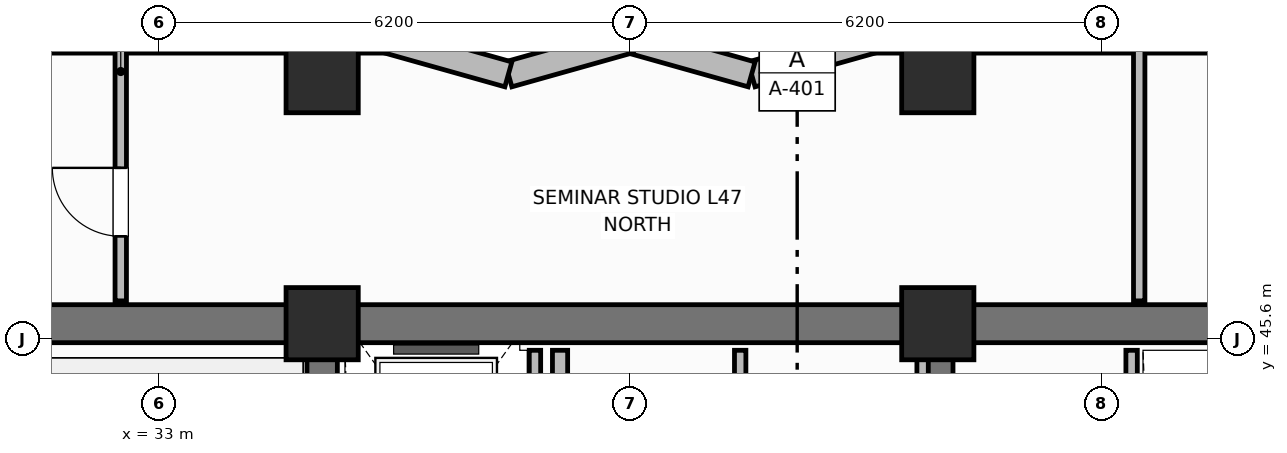
"""IFC4 building model, lengths in metres.
Left out: names, types, materials, properties, quantities, classifications, styles, units other than length and angle.
Written with IfcOpenShell. Run it as: python <this file> out.ifc"""

import sys

from ifc_helpers import new_model, si_unit, direction, frame, frame_2d, origin, origin_2d, place, context, subcontext, project, spatial, rectangle, extrude, element, fill, save


model = new_model("IFC4")
c1 = context("Model", 3, precision=1e-05, world=origin(), true_north=direction((0.0, 1.0)))
c2 = subcontext(c1, "Body", "Model", "MODEL_VIEW")
j1 = project(units=[si_unit("LENGTHUNIT", "METRE"), si_unit("PLANEANGLEUNIT", "RADIAN")], contexts=[c1])
p1 = place(None, origin())
s1 = spatial("IfcSite", under=j1, at=p1, CompositionType="ELEMENT")
p2 = place(p1, origin())
s2 = spatial("IfcBuilding", under=s1, at=p2, CompositionType="ELEMENT")
p3 = place(p2, frame((0.0, 0.0, 188.5)))
s3 = spatial("IfcBuildingStorey", under=s2, at=p3, CompositionType="ELEMENT", Elevation=188.5)
p4 = place(p3, frame((25.6, 45.8, 0.0), z_axis=(0.0, 0.0, 1.0), x_axis=(1.0, 0.0, 0.0)))
e1 = element("IfcWall", 1, at=p4, inside=s3, PredefinedType="SHEAR", context=c2, shape_type="SweptSolid", body=[
    extrude(rectangle(XDim=27.2, YDim=0.5, at=frame_2d((13.6, 0.0))), origin(), (0.0, 0.0, 1.0), 3.7),
])
for number, where, z_axis, x_axis in (
    (2, (35.15, 39.85, 0.0), (0.0, 0.0, 1.0), (0.0, 1.0, 0.0)),
    (3, (43.25, 39.85, 0.0), (0.0, 0.0, 1.0), (0.0, 1.0, 0.0)),
):
    element("IfcWall", number, at=place(p3, frame(where, z_axis=z_axis, x_axis=x_axis)), inside=s3, PredefinedType="SHEAR", context=c2, shape_type="SweptSolid", body=[
        extrude(rectangle(XDim=5.7, YDim=0.4, at=frame_2d((2.85, 0.0))), origin(), (0.0, 0.0, 1.0), 3.7),
    ])
for number, where, z_axis, x_axis in (
    (4, (35.15, 45.8, 0.0), (0.0, 0.0, 1.0), (1.0, 0.0, 0.0)),
    (5, (43.25, 45.8, 0.0), (0.0, 0.0, 1.0), (1.0, 0.0, 0.0)),
    (6, (35.15, 49.05, 0.0), (0.0, 0.0, 1.0), (1.0, 0.0, 0.0)),
    (7, (43.25, 49.05, 0.0), (0.0, 0.0, 1.0), (1.0, 0.0, 0.0)),
):
    element("IfcColumn", number, at=place(p3, frame(where, z_axis=z_axis, x_axis=x_axis)), inside=s3, PredefinedType="COLUMN", context=c2, shape_type="SweptSolid", body=[
        extrude(rectangle(XDim=0.95, YDim=0.95, at=origin_2d()), origin(), (0.0, 0.0, 1.0), 3.7),
    ])
p5 = place(p3, frame((58.2, 49.53, 0.0), z_axis=(0.0, 0.0, 1.0), x_axis=(-1.0, 0.0, 0.0)))
e8 = element("IfcWall", 8, at=p5, inside=s3, PredefinedType="SOLIDWALL", context=c2, shape_type="SweptSolid", body=[
    extrude(rectangle(XDim=15.8, YDim=0.34, at=frame_2d((7.9, 0.0))), origin(), (0.0, 0.0, 1.0), 2.72),
])
p6 = place(p5, frame((8.812, 0.0, 0.75)))
e9 = element("IfcOpeningElement", 9, at=p6, cuts=e8, PredefinedType="OPENING", context=c2, shape_type="SweptSolid", body=[
    extrude(rectangle(XDim=1.8, YDim=1.85, at=frame_2d((0.9, 0.925))), frame((0.0, 0.18, 0.0), z_axis=(0.0, -1.0, 0.0), x_axis=(1.0, 0.0, 0.0)), (0.0, 0.0, 1.0), 0.36),
])
p7 = place(p3, frame((42.4, 49.53, 0.0), z_axis=(0.0, 0.0, 1.0), x_axis=(-0.962652136636, -0.270741322725, 0.0)))
e10 = element("IfcWall", 10, at=p7, inside=s3, PredefinedType="SOLIDWALL", context=c2, shape_type="SweptSolid", body=[
    extrude(rectangle(XDim=1.662, YDim=0.34, at=frame_2d((0.831, 0.0))), origin(), (0.0, 0.0, 1.0), 2.72),
])
p8 = place(p3, frame((40.8, 49.08, 0.0), z_axis=(0.0, 0.0, 1.0), x_axis=(-0.962662902433, 0.270703040766, 0.0)))
e11 = element("IfcWall", 11, at=p8, inside=s3, PredefinedType="SOLIDWALL", context=c2, shape_type="SweptSolid", body=[
    extrude(rectangle(XDim=1.662, YDim=0.34, at=frame_2d((0.831, 0.0))), origin(), (0.0, 0.0, 1.0), 2.72),
])
p9 = place(p3, frame((39.2, 49.53, 0.0), z_axis=(0.0, 0.0, 1.0), x_axis=(-0.962652136636, -0.270741322725, 0.0)))
e12 = element("IfcWall", 12, at=p9, inside=s3, PredefinedType="SOLIDWALL", context=c2, shape_type="SweptSolid", body=[
    extrude(rectangle(XDim=1.662, YDim=0.34, at=frame_2d((0.831, 0.0))), origin(), (0.0, 0.0, 1.0), 2.72),
])
p10 = place(p3, frame((37.6, 49.08, 0.0), z_axis=(0.0, 0.0, 1.0), x_axis=(-0.962662902433, 0.270703040766, 0.0)))
e13 = element("IfcWall", 13, at=p10, inside=s3, PredefinedType="SOLIDWALL", context=c2, shape_type="SweptSolid", body=[
    extrude(rectangle(XDim=1.662, YDim=0.34, at=frame_2d((0.831, 0.0))), origin(), (0.0, 0.0, 1.0), 2.72),
])
p11 = place(p3, frame((36.0, 49.53, 0.0), z_axis=(0.0, 0.0, 1.0), x_axis=(-1.0, 0.0, 0.0)))
e14 = element("IfcWall", 14, at=p11, inside=s3, PredefinedType="SOLIDWALL", context=c2, shape_type="SweptSolid", body=[
    extrude(rectangle(XDim=15.8, YDim=0.34, at=frame_2d((7.9, 0.0))), origin(), (0.0, 0.0, 1.0), 2.72),
])
p12 = place(p11, frame((5.188, 0.0, 0.75)))
e15 = element("IfcOpeningElement", 15, at=p12, cuts=e14, PredefinedType="OPENING", context=c2, shape_type="SweptSolid", body=[
    extrude(rectangle(XDim=1.8, YDim=1.85, at=frame_2d((0.9, 0.925))), frame((0.0, 0.18, 0.0), z_axis=(0.0, -1.0, 0.0), x_axis=(1.0, 0.0, 0.0)), (0.0, 0.0, 1.0), 0.36),
])
p13 = place(p11, frame((12.788, 0.0, 0.75)))
e16 = element("IfcOpeningElement", 16, at=p13, cuts=e14, PredefinedType="OPENING", context=c2, shape_type="SweptSolid", body=[
    extrude(rectangle(XDim=1.8, YDim=1.85, at=frame_2d((0.9, 0.925))), frame((0.0, 0.18, 0.0), z_axis=(0.0, -1.0, 0.0), x_axis=(1.0, 0.0, 0.0)), (0.0, 0.0, 1.0), 0.36),
])
p14 = place(p3, frame((37.95, 42.6, 0.0), z_axis=(0.0, 0.0, 1.0), x_axis=(0.0, 1.0, 0.0)))
e17 = element("IfcWall", 17, at=p14, inside=s3, PredefinedType="PARTITIONING", context=c2, shape_type="SweptSolid", body=[
    extrude(rectangle(XDim=2.85, YDim=0.15, at=frame_2d((1.425, 0.0))), origin(), (0.0, 0.0, 1.0), 2.55),
])
p15 = place(p3, frame((38.28, 39.82, 0.0), z_axis=(0.0, 0.0, 1.0), x_axis=(0.0, 1.0, 0.0)))
e18 = element("IfcWall", 18, at=p15, inside=s3, PredefinedType="PARTITIONING", context=c2, shape_type="SweptSolid", body=[
    extrude(rectangle(XDim=5.63, YDim=0.2, at=frame_2d((2.815, 0.0))), origin(), (0.0, 0.0, 1.0), 2.55),
])
for number, where, z_axis, x_axis in (
    (19, (43.05, 39.82, 0.0), (0.0, 0.0, 1.0), (0.0, 1.0, 0.0)),
    (20, (40.65, 39.82, 0.0), (0.0, 0.0, 1.0), (0.0, 1.0, 0.0)),
    (21, (45.8, 39.82, 0.0), (0.0, 0.0, 1.0), (0.0, 1.0, 0.0)),
):
    element("IfcWall", number, at=place(p3, frame(where, z_axis=z_axis, x_axis=x_axis)), inside=s3, PredefinedType="PARTITIONING", context=c2, shape_type="SweptSolid", body=[
        extrude(rectangle(XDim=5.63, YDim=0.15, at=frame_2d((2.815, 0.0))), origin(), (0.0, 0.0, 1.0), 2.55),
    ])
p16 = place(p3, frame((32.5, 46.1, 0.0), z_axis=(0.0, 0.0, 1.0), x_axis=(0.0, 1.0, 0.0)))
e22 = element("IfcWall", 22, at=p16, inside=s3, PredefinedType="PARTITIONING", context=c2, shape_type="SweptSolid", body=[
    extrude(rectangle(XDim=3.43, YDim=0.15, at=frame_2d((1.715, 0.0))), origin(), (0.0, 0.0, 1.0), 2.55),
])
p17 = place(p16, frame((0.85, 0.0, 0.0)))
e23 = element("IfcOpeningElement", 23, at=p17, cuts=e22, PredefinedType="OPENING", context=c2, shape_type="SweptSolid", body=[
    extrude(rectangle(XDim=0.9, YDim=2.1, at=frame_2d((0.45, 1.05))), frame((0.0, 0.085, 0.0), z_axis=(0.0, -1.0, 0.0), x_axis=(1.0, 0.0, 0.0)), (0.0, 0.0, 1.0), 0.17),
])
p18 = place(p3, frame((45.9, 46.1, 0.0), z_axis=(0.0, 0.0, 1.0), x_axis=(0.0, 1.0, 0.0)))
e24 = element("IfcWall", 24, at=p18, inside=s3, PredefinedType="PARTITIONING", context=c2, shape_type="SweptSolid", body=[
    extrude(rectangle(XDim=3.43, YDim=0.15, at=frame_2d((1.715, 0.0))), origin(), (0.0, 0.0, 1.0), 2.55),
])
p19 = place(p17, origin())
e25 = element("IfcDoor", 25, at=p19, inside=s3, OperationType="SINGLE_SWING_RIGHT", PredefinedType="DOOR", context=c2, shape_type="SweptSolid", body=[
    extrude(rectangle(XDim=0.9, YDim=2.1, at=frame_2d((0.45, 1.05))), frame((0.0, 0.025, 0.0), z_axis=(0.0, -1.0, 0.0), x_axis=(1.0, 0.0, 0.0)), (0.0, 0.0, 1.0), 0.05),
])
fill(e23, e25)
save(model, sys.argv[1])
